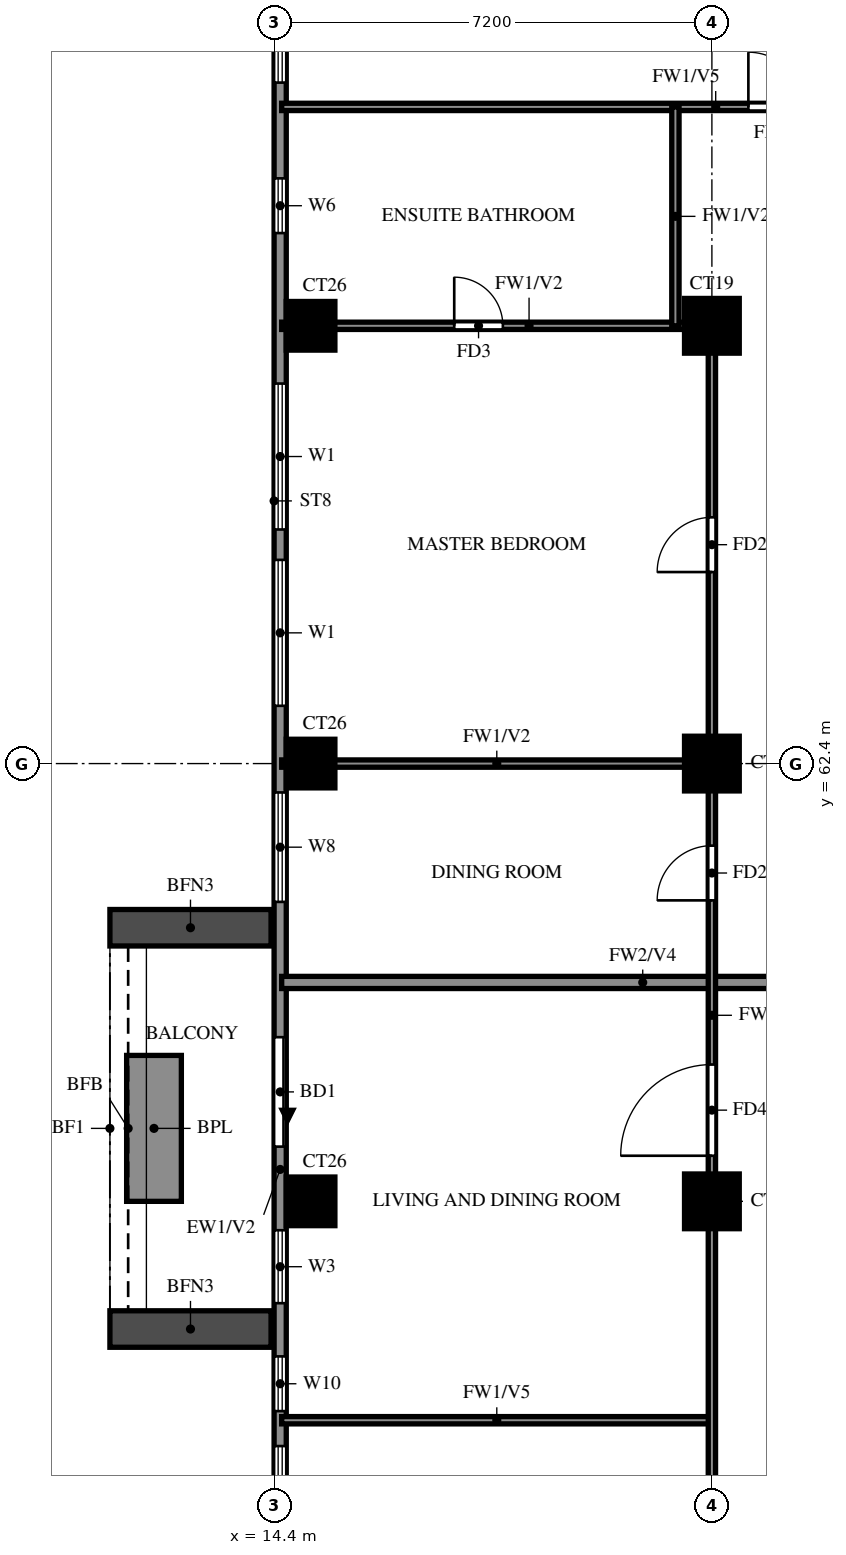
"""IFC4 building model, lengths in metres.
Left out: names, types, materials, properties, quantities, classifications, styles, units other than length and angle.
Written with IfcOpenShell. Run it as: python <this file> out.ifc"""

import sys

from ifc_helpers import new_model, si_unit, direction, frame, frame_2d, origin, origin_2d, place, context, subcontext, project, spatial, rectangle, extrude, source, transform, mapped, element, fill, save


model = new_model("IFC4")
c1 = context("Model", 3, precision=1e-05, world=origin(), true_north=direction((0.0, 1.0)))
c2 = subcontext(c1, "Body", "Model", "MODEL_VIEW")
j1 = project(units=[si_unit("LENGTHUNIT", "METRE"), si_unit("PLANEANGLEUNIT", "RADIAN")], contexts=[c1])
p1 = place(None, origin())
s1 = spatial("IfcSite", under=j1, at=p1, CompositionType="ELEMENT")
p2 = place(p1, origin())
s2 = spatial("IfcBuilding", under=s1, at=p2, CompositionType="ELEMENT")
p3 = place(p2, frame((0.0, 0.0, 181.5)))
s3 = spatial("IfcBuildingStorey", under=s2, at=p3, CompositionType="ELEMENT", Elevation=181.5)
m1 = source(origin(), c2, "Body", "SweptSolid", [
    extrude(rectangle(XDim=0.8, YDim=0.8, at=origin_2d()), origin(), (0.0, 0.0, 1.0), 3.2),
])
p4 = place(p3, frame((15.0, 55.2, 0.0), z_axis=(0.0, 0.0, 1.0), x_axis=(1.0, 0.0, 0.0)))
e1 = element("IfcColumn", 1, at=p4, inside=s3, PredefinedType="COLUMN", context=c2, shape_type="MappedRepresentation", body=[
    mapped(m1, transform((0.0, 0.0, 0.0))),
])
m2 = source(origin(), c2, "Body", "SweptSolid", [
    extrude(rectangle(XDim=0.9, YDim=0.9, at=origin_2d()), origin(), (0.0, 0.0, 1.0), 3.2),
])
p5 = place(p3, frame((21.6, 55.2, 0.0), z_axis=(0.0, 0.0, 1.0), x_axis=(1.0, 0.0, 0.0)))
e2 = element("IfcColumn", 2, at=p5, inside=s3, PredefinedType="COLUMN", context=c2, shape_type="MappedRepresentation", body=[
    mapped(m2, transform((0.0, 0.0, 0.0))),
])
p6 = place(p3, frame((15.0, 62.4, 0.0), z_axis=(0.0, 0.0, 1.0), x_axis=(1.0, 0.0, 0.0)))
e3 = element("IfcColumn", 3, at=p6, inside=s3, PredefinedType="COLUMN", context=c2, shape_type="MappedRepresentation", body=[
    mapped(m1, transform((0.0, 0.0, 0.0))),
])
p7 = place(p3, frame((21.6, 62.4, 0.0), z_axis=(0.0, 0.0, 1.0), x_axis=(1.0, 0.0, 0.0)))
e4 = element("IfcColumn", 4, at=p7, inside=s3, PredefinedType="COLUMN", context=c2, shape_type="MappedRepresentation", body=[
    mapped(m2, transform((0.0, 0.0, 0.0))),
])
p8 = place(p3, frame((15.0, 69.6, 0.0), z_axis=(0.0, 0.0, 1.0), x_axis=(1.0, 0.0, 0.0)))
e5 = element("IfcColumn", 5, at=p8, inside=s3, PredefinedType="COLUMN", context=c2, shape_type="MappedRepresentation", body=[
    mapped(m1, transform((0.0, 0.0, 0.0))),
])
p9 = place(p3, frame((21.6, 69.6, 0.0), z_axis=(0.0, 0.0, 1.0), x_axis=(1.0, 0.0, 0.0)))
e6 = element("IfcColumn", 6, at=p9, inside=s3, PredefinedType="COLUMN", context=c2, shape_type="MappedRepresentation", body=[
    mapped(m2, transform((0.0, 0.0, 0.0))),
])
p10 = place(p3, frame((14.5, 76.6, 0.0), z_axis=(0.0, 0.0, 1.0), x_axis=(0.0, -1.0, 0.0)))
e7 = element("IfcWall", 7, at=p10, inside=s3, PredefinedType="SOLIDWALL", context=c2, shape_type="SweptSolid", body=[
    extrude(rectangle(XDim=33.4, YDim=0.2, at=frame_2d((16.7, 0.0))), origin(), (0.0, 0.0, 1.0), 3.2),
])
p11 = place(p10, frame((18.7, 0.0, 0.0)))
e8 = element("IfcOpeningElement", 8, at=p11, cuts=e7, PredefinedType="OPENING", context=c2, shape_type="SweptSolid", body=[
    extrude(rectangle(XDim=1.8, YDim=2.4, at=frame_2d((0.9, 1.2))), frame((0.0, 0.11, 0.0), z_axis=(0.0, -1.0, 0.0), x_axis=(1.0, 0.0, 0.0)), (0.0, 0.0, 1.0), 0.22),
])
p12 = place(p10, frame((29.875, 0.0, 0.6)))
e9 = element("IfcOpeningElement", 9, at=p12, cuts=e7, PredefinedType="OPENING", context=c2, shape_type="SweptSolid", body=[
    extrude(rectangle(XDim=2.4, YDim=2.4, at=frame_2d((1.2, 1.2))), frame((0.0, 0.11, 0.0), z_axis=(0.0, -1.0, 0.0), x_axis=(1.0, 0.0, 0.0)), (0.0, 0.0, 1.0), 0.22),
])
p13 = place(p10, frame((25.425, 0.0, 0.6)))
e10 = element("IfcOpeningElement", 10, at=p13, cuts=e7, PredefinedType="OPENING", context=c2, shape_type="SweptSolid", body=[
    extrude(rectangle(XDim=2.4, YDim=2.4, at=frame_2d((1.2, 1.2))), frame((0.0, 0.11, 0.0), z_axis=(0.0, -1.0, 0.0), x_axis=(1.0, 0.0, 0.0)), (0.0, 0.0, 1.0), 0.22),
])
p14 = place(p10, frame((21.875, 0.0, 0.6)))
e11 = element("IfcOpeningElement", 11, at=p14, cuts=e7, PredefinedType="OPENING", context=c2, shape_type="SweptSolid", body=[
    extrude(rectangle(XDim=1.2, YDim=2.4, at=frame_2d((0.6, 1.2))), frame((0.0, 0.11, 0.0), z_axis=(0.0, -1.0, 0.0), x_axis=(1.0, 0.0, 0.0)), (0.0, 0.0, 1.0), 0.22),
])
p15 = place(p10, frame((23.95, 0.0, 0.6)))
e12 = element("IfcOpeningElement", 12, at=p15, cuts=e7, PredefinedType="OPENING", context=c2, shape_type="SweptSolid", body=[
    extrude(rectangle(XDim=0.9, YDim=2.4, at=frame_2d((0.45, 1.2))), frame((0.0, 0.11, 0.0), z_axis=(0.0, -1.0, 0.0), x_axis=(1.0, 0.0, 0.0)), (0.0, 0.0, 1.0), 0.22),
])
p16 = place(p10, frame((14.675, 0.0, 0.6)))
e13 = element("IfcOpeningElement", 13, at=p16, cuts=e7, PredefinedType="OPENING", context=c2, shape_type="SweptSolid", body=[
    extrude(rectangle(XDim=1.8, YDim=2.4, at=frame_2d((0.9, 1.2))), frame((0.0, 0.11, 0.0), z_axis=(0.0, -1.0, 0.0), x_axis=(1.0, 0.0, 0.0)), (0.0, 0.0, 1.0), 0.22),
])
p17 = place(p10, frame((7.95, 0.0, 0.6)))
e14 = element("IfcOpeningElement", 14, at=p17, cuts=e7, PredefinedType="OPENING", context=c2, shape_type="SweptSolid", body=[
    extrude(rectangle(XDim=2.4, YDim=2.4, at=frame_2d((1.2, 1.2))), frame((0.0, 0.11, 0.0), z_axis=(0.0, -1.0, 0.0), x_axis=(1.0, 0.0, 0.0)), (0.0, 0.0, 1.0), 0.22),
])
p18 = place(p10, frame((10.85, 0.0, 0.6)))
e15 = element("IfcOpeningElement", 15, at=p18, cuts=e7, PredefinedType="OPENING", context=c2, shape_type="SweptSolid", body=[
    extrude(rectangle(XDim=2.4, YDim=2.4, at=frame_2d((1.2, 1.2))), frame((0.0, 0.11, 0.0), z_axis=(0.0, -1.0, 0.0), x_axis=(1.0, 0.0, 0.0)), (0.0, 0.0, 1.0), 0.22),
])
p19 = place(p10, frame((4.575, 0.0, 1.5)))
e16 = element("IfcOpeningElement", 16, at=p19, cuts=e7, PredefinedType="OPENING", context=c2, shape_type="SweptSolid", body=[
    extrude(rectangle(XDim=0.9, YDim=0.9, at=frame_2d((0.45, 0.45))), frame((0.0, 0.11, 0.0), z_axis=(0.0, -1.0, 0.0), x_axis=(1.0, 0.0, 0.0)), (0.0, 0.0, 1.0), 0.22),
])
p20 = place(p10, frame((0.6, 0.0, 0.6)))
e17 = element("IfcOpeningElement", 17, at=p20, cuts=e7, PredefinedType="OPENING", context=c2, shape_type="SweptSolid", body=[
    extrude(rectangle(XDim=2.4, YDim=2.4, at=frame_2d((1.2, 1.2))), frame((0.0, 0.11, 0.0), z_axis=(0.0, -1.0, 0.0), x_axis=(1.0, 0.0, 0.0)), (0.0, 0.0, 1.0), 0.22),
])
for number, where, z_axis, x_axis in (
    (18, (14.35, 59.7, 0.0), (0.0, 0.0, 1.0), (-1.0, 0.0, 0.0)),
    (19, (14.35, 53.1, 0.0), (0.0, 0.0, 1.0), (-1.0, 0.0, 0.0)),
):
    element("IfcWall", number, at=place(p3, frame(where, z_axis=z_axis, x_axis=x_axis)), inside=s3, PredefinedType="SOLIDWALL", context=c2, shape_type="SweptSolid", body=[
        extrude(rectangle(XDim=2.65, YDim=0.6, at=frame_2d((1.325, 0.0))), origin(), (0.0, 0.0, 1.0), 2.85),
    ])
p21 = place(p3, frame((12.425, 57.6, 0.0), z_axis=(0.0, 0.0, 1.0), x_axis=(0.0, -1.0, 0.0)))
e20 = element("IfcWall", 20, at=p21, inside=s3, PredefinedType="SOLIDWALL", context=c2, shape_type="SweptSolid", body=[
    extrude(rectangle(XDim=2.4, YDim=0.9, at=frame_2d((1.2, 0.0))), origin(), (0.0, 0.0, 1.0), 0.9),
])
p22 = place(p3, frame((14.525, 58.8, 0.0), z_axis=(0.0, 0.0, 1.0), x_axis=(1.0, 0.0, 0.0)))
e21 = element("IfcWall", 21, at=p22, inside=s3, PredefinedType="SOLIDWALL", context=c2, shape_type="SweptSolid", body=[
    extrude(rectangle(XDim=11.875, YDim=0.2, at=frame_2d((5.938, 0.0))), origin(), (0.0, 0.0, 1.0), 2.3),
])
p23 = place(p3, frame((14.525, 51.6, 0.0), z_axis=(0.0, 0.0, 1.0), x_axis=(1.0, 0.0, 0.0)))
e22 = element("IfcWall", 22, at=p23, inside=s3, PredefinedType="PARTITIONING", context=c2, shape_type="SweptSolid", body=[
    extrude(rectangle(XDim=7.075, YDim=0.12, at=frame_2d((3.538, 0.0))), origin(), (0.0, 0.0, 1.0), 2.3),
])
p24 = place(p3, frame((14.525, 62.4, 0.0), z_axis=(0.0, 0.0, 1.0), x_axis=(1.0, 0.0, 0.0)))
e23 = element("IfcWall", 23, at=p24, inside=s3, PredefinedType="PARTITIONING", context=c2, shape_type="SweptSolid", body=[
    extrude(rectangle(XDim=7.075, YDim=0.12, at=frame_2d((3.538, 0.0))), origin(), (0.0, 0.0, 1.0), 3.2),
])
p25 = place(p3, frame((14.525, 69.6, 0.0), z_axis=(0.0, 0.0, 1.0), x_axis=(1.0, 0.0, 0.0)))
e24 = element("IfcWall", 24, at=p25, inside=s3, PredefinedType="PARTITIONING", context=c2, shape_type="SweptSolid", body=[
    extrude(rectangle(XDim=7.075, YDim=0.12, at=frame_2d((3.538, 0.0))), origin(), (0.0, 0.0, 1.0), 3.2),
])
p26 = place(p25, frame((2.837, 0.0, 0.0)))
e25 = element("IfcOpeningElement", 25, at=p26, cuts=e24, PredefinedType="OPENING", context=c2, shape_type="SweptSolid", body=[
    extrude(rectangle(XDim=0.8, YDim=2.1, at=frame_2d((0.4, 1.05))), frame((0.0, 0.07, 0.0), z_axis=(0.0, -1.0, 0.0), x_axis=(1.0, 0.0, 0.0)), (0.0, 0.0, 1.0), 0.14),
])
p27 = place(p3, frame((14.525, 73.2, 0.0), z_axis=(0.0, 0.0, 1.0), x_axis=(1.0, 0.0, 0.0)))
e26 = element("IfcWall", 26, at=p27, inside=s3, PredefinedType="PARTITIONING", context=c2, shape_type="SweptSolid", body=[
    extrude(rectangle(XDim=14.275, YDim=0.12, at=frame_2d((7.138, 0.0))), origin(), (0.0, 0.0, 1.0), 2.3),
])
p28 = place(p27, frame((7.675, 0.0, 0.0)))
e27 = element("IfcOpeningElement", 27, at=p28, cuts=e26, PredefinedType="OPENING", context=c2, shape_type="SweptSolid", body=[
    extrude(rectangle(XDim=0.9, YDim=2.1, at=frame_2d((0.45, 1.05))), frame((0.0, 0.07, 0.0), z_axis=(0.0, -1.0, 0.0), x_axis=(1.0, 0.0, 0.0)), (0.0, 0.0, 1.0), 0.14),
])
p29 = place(p3, frame((21.0, 69.6, 0.0), z_axis=(0.0, 0.0, 1.0), x_axis=(0.0, 1.0, 0.0)))
e28 = element("IfcWall", 28, at=p29, inside=s3, PredefinedType="PARTITIONING", context=c2, shape_type="SweptSolid", body=[
    extrude(rectangle(XDim=3.6, YDim=0.12, at=frame_2d((1.8, 0.0))), origin(), (0.0, 0.0, 1.0), 3.2),
])
p30 = place(p3, frame((21.6, 48.0, 0.0), z_axis=(0.0, 0.0, 1.0), x_axis=(0.0, 1.0, 0.0)))
e29 = element("IfcWall", 29, at=p30, inside=s3, PredefinedType="PARTITIONING", context=c2, shape_type="SweptSolid", body=[
    extrude(rectangle(XDim=21.6, YDim=0.12, at=frame_2d((10.8, 0.0))), origin(), (0.0, 0.0, 1.0), 3.2),
])
p31 = place(p30, frame((1.35, 0.0, 0.0)))
e30 = element("IfcOpeningElement", 30, at=p31, cuts=e29, PredefinedType="OPENING", context=c2, shape_type="SweptSolid", body=[
    extrude(rectangle(XDim=0.9, YDim=2.1, at=frame_2d((0.45, 1.05))), frame((0.0, 0.07, 0.0), z_axis=(0.0, -1.0, 0.0), x_axis=(1.0, 0.0, 0.0)), (0.0, 0.0, 1.0), 0.14),
])
p32 = place(p30, frame((7.95, 0.0, 0.0)))
e31 = element("IfcOpeningElement", 31, at=p32, cuts=e29, PredefinedType="OPENING", context=c2, shape_type="SweptSolid", body=[
    extrude(rectangle(XDim=1.5, YDim=2.1, at=frame_2d((0.75, 1.05))), frame((0.0, 0.07, 0.0), z_axis=(0.0, -1.0, 0.0), x_axis=(1.0, 0.0, 0.0)), (0.0, 0.0, 1.0), 0.14),
])
p33 = place(p30, frame((12.15, 0.0, 0.0)))
e32 = element("IfcOpeningElement", 32, at=p33, cuts=e29, PredefinedType="OPENING", context=c2, shape_type="SweptSolid", body=[
    extrude(rectangle(XDim=0.9, YDim=2.1, at=frame_2d((0.45, 1.05))), frame((0.0, 0.07, 0.0), z_axis=(0.0, -1.0, 0.0), x_axis=(1.0, 0.0, 0.0)), (0.0, 0.0, 1.0), 0.14),
])
p34 = place(p30, frame((17.55, 0.0, 0.0)))
e33 = element("IfcOpeningElement", 33, at=p34, cuts=e29, PredefinedType="OPENING", context=c2, shape_type="SweptSolid", body=[
    extrude(rectangle(XDim=0.9, YDim=2.1, at=frame_2d((0.45, 1.05))), frame((0.0, 0.07, 0.0), z_axis=(0.0, -1.0, 0.0), x_axis=(1.0, 0.0, 0.0)), (0.0, 0.0, 1.0), 0.14),
])
p35 = place(p11, origin())
e34 = element("IfcDoor", 34, at=p35, inside=s3, OperationType="DOUBLE_DOOR_SLIDING", PredefinedType="DOOR", context=c2, shape_type="SweptSolid", body=[
    extrude(rectangle(XDim=1.8, YDim=2.4, at=frame_2d((0.9, 1.2))), frame((0.0, 0.025, 0.0), z_axis=(0.0, -1.0, 0.0), x_axis=(1.0, 0.0, 0.0)), (0.0, 0.0, 1.0), 0.05),
])
fill(e8, e34)
p36 = place(p13, origin())
e35 = element("IfcWindow", 35, at=p36, inside=s3, PartitioningType="DOUBLE_PANEL_VERTICAL", PredefinedType="WINDOW", context=c2, shape_type="SweptSolid", body=[
    extrude(rectangle(XDim=2.4, YDim=2.4, at=frame_2d((1.2, 1.2))), frame((0.0, 0.03, 0.0), z_axis=(0.0, -1.0, 0.0), x_axis=(1.0, 0.0, 0.0)), (0.0, 0.0, 1.0), 0.06),
])
fill(e10, e35)
p37 = place(p14, origin())
e36 = element("IfcWindow", 36, at=p37, inside=s3, PartitioningType="SINGLE_PANEL", PredefinedType="WINDOW", context=c2, shape_type="SweptSolid", body=[
    extrude(rectangle(XDim=1.2, YDim=2.4, at=frame_2d((0.6, 1.2))), frame((0.0, 0.03, 0.0), z_axis=(0.0, -1.0, 0.0), x_axis=(1.0, 0.0, 0.0)), (0.0, 0.0, 1.0), 0.06),
])
fill(e11, e36)
p38 = place(p15, origin())
e37 = element("IfcWindow", 37, at=p38, inside=s3, PartitioningType="SINGLE_PANEL", PredefinedType="WINDOW", context=c2, shape_type="SweptSolid", body=[
    extrude(rectangle(XDim=0.9, YDim=2.4, at=frame_2d((0.45, 1.2))), frame((0.0, 0.03, 0.0), z_axis=(0.0, -1.0, 0.0), x_axis=(1.0, 0.0, 0.0)), (0.0, 0.0, 1.0), 0.06),
])
fill(e12, e37)
p39 = place(p16, origin())
e38 = element("IfcWindow", 38, at=p39, inside=s3, PartitioningType="DOUBLE_PANEL_VERTICAL", PredefinedType="WINDOW", context=c2, shape_type="SweptSolid", body=[
    extrude(rectangle(XDim=1.8, YDim=2.4, at=frame_2d((0.9, 1.2))), frame((0.0, 0.03, 0.0), z_axis=(0.0, -1.0, 0.0), x_axis=(1.0, 0.0, 0.0)), (0.0, 0.0, 1.0), 0.06),
])
fill(e13, e38)
p40 = place(p17, origin())
e39 = element("IfcWindow", 39, at=p40, inside=s3, PartitioningType="DOUBLE_PANEL_VERTICAL", PredefinedType="WINDOW", context=c2, shape_type="SweptSolid", body=[
    extrude(rectangle(XDim=2.4, YDim=2.4, at=frame_2d((1.2, 1.2))), frame((0.0, 0.03, 0.0), z_axis=(0.0, -1.0, 0.0), x_axis=(1.0, 0.0, 0.0)), (0.0, 0.0, 1.0), 0.06),
])
fill(e14, e39)
p41 = place(p18, origin())
e40 = element("IfcWindow", 40, at=p41, inside=s3, PartitioningType="DOUBLE_PANEL_VERTICAL", PredefinedType="WINDOW", context=c2, shape_type="SweptSolid", body=[
    extrude(rectangle(XDim=2.4, YDim=2.4, at=frame_2d((1.2, 1.2))), frame((0.0, 0.03, 0.0), z_axis=(0.0, -1.0, 0.0), x_axis=(1.0, 0.0, 0.0)), (0.0, 0.0, 1.0), 0.06),
])
fill(e15, e40)
p42 = place(p19, origin())
e41 = element("IfcWindow", 41, at=p42, inside=s3, PartitioningType="SINGLE_PANEL", PredefinedType="WINDOW", context=c2, shape_type="SweptSolid", body=[
    extrude(rectangle(XDim=0.9, YDim=0.9, at=frame_2d((0.45, 0.45))), frame((0.0, 0.03, 0.0), z_axis=(0.0, -1.0, 0.0), x_axis=(1.0, 0.0, 0.0)), (0.0, 0.0, 1.0), 0.06),
])
fill(e16, e41)
p43 = place(p20, origin())
e42 = element("IfcWindow", 42, at=p43, inside=s3, PartitioningType="DOUBLE_PANEL_VERTICAL", PredefinedType="WINDOW", context=c2, shape_type="SweptSolid", body=[
    extrude(rectangle(XDim=2.4, YDim=2.4, at=frame_2d((1.2, 1.2))), frame((0.0, 0.03, 0.0), z_axis=(0.0, -1.0, 0.0), x_axis=(1.0, 0.0, 0.0)), (0.0, 0.0, 1.0), 0.06),
])
fill(e17, e42)
p44 = place(p32, origin())
e43 = element("IfcDoor", 43, at=p44, inside=s3, OperationType="SINGLE_SWING_LEFT", PredefinedType="DOOR", context=c2, shape_type="SweptSolid", body=[
    extrude(rectangle(XDim=1.5, YDim=2.1, at=frame_2d((0.75, 1.05))), frame((0.0, 0.025, 0.0), z_axis=(0.0, -1.0, 0.0), x_axis=(1.0, 0.0, 0.0)), (0.0, 0.0, 1.0), 0.05),
])
fill(e31, e43)
p45 = place(p33, origin())
e44 = element("IfcDoor", 44, at=p45, inside=s3, OperationType="SINGLE_SWING_RIGHT", PredefinedType="DOOR", context=c2, shape_type="SweptSolid", body=[
    extrude(rectangle(XDim=0.9, YDim=2.1, at=frame_2d((0.45, 1.05))), frame((0.0, 0.025, 0.0), z_axis=(0.0, -1.0, 0.0), x_axis=(1.0, 0.0, 0.0)), (0.0, 0.0, 1.0), 0.05),
])
fill(e32, e44)
p46 = place(p34, origin())
e45 = element("IfcDoor", 45, at=p46, inside=s3, OperationType="SINGLE_SWING_LEFT", PredefinedType="DOOR", context=c2, shape_type="SweptSolid", body=[
    extrude(rectangle(XDim=0.9, YDim=2.1, at=frame_2d((0.45, 1.05))), frame((0.0, 0.025, 0.0), z_axis=(0.0, -1.0, 0.0), x_axis=(1.0, 0.0, 0.0)), (0.0, 0.0, 1.0), 0.05),
])
fill(e33, e45)
p47 = place(p26, origin())
e46 = element("IfcDoor", 46, at=p47, inside=s3, OperationType="SINGLE_SWING_LEFT", PredefinedType="DOOR", context=c2, shape_type="SweptSolid", body=[
    extrude(rectangle(XDim=0.8, YDim=2.1, at=frame_2d((0.4, 1.05))), frame((0.0, 0.025, 0.0), z_axis=(0.0, -1.0, 0.0), x_axis=(1.0, 0.0, 0.0)), (0.0, 0.0, 1.0), 0.05),
])
fill(e25, e46)
p48 = place(p28, origin())
e47 = element("IfcDoor", 47, at=p48, inside=s3, OperationType="SINGLE_SWING_RIGHT", PredefinedType="DOOR", context=c2, shape_type="SweptSolid", body=[
    extrude(rectangle(XDim=0.9, YDim=2.1, at=frame_2d((0.45, 1.05))), frame((0.0, 0.025, 0.0), z_axis=(0.0, -1.0, 0.0), x_axis=(1.0, 0.0, 0.0)), (0.0, 0.0, 1.0), 0.05),
])
fill(e27, e47)
save(model, sys.argv[1])
